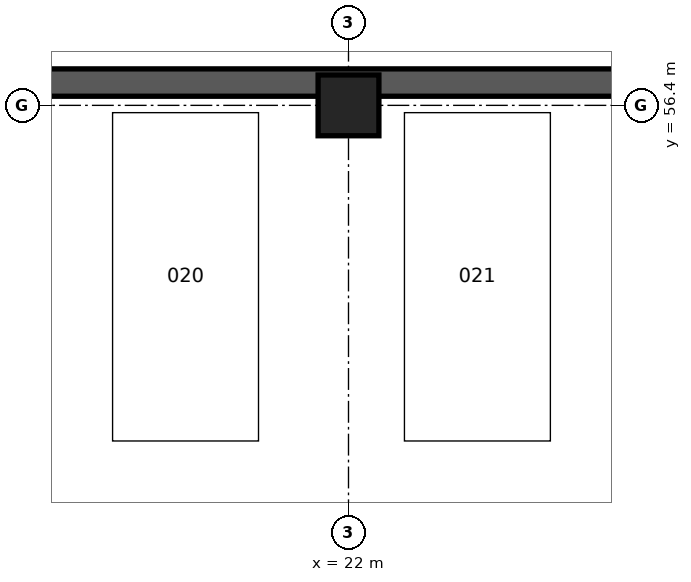
"""IFC4 building model, lengths in metres.
Left out: names, types, materials, properties, quantities, classifications, styles, units other than length and angle.
Written with IfcOpenShell. Run it as: python <this file> out.ifc"""

import sys

from ifc_helpers import new_model, si_unit, direction, frame, frame_2d, origin, origin_2d, place, context, subcontext, project, spatial, rectangle, extrude, element, save


model = new_model("IFC4")
c1 = context("Model", 3, precision=1e-05, world=origin(), true_north=direction((0.0, 1.0)))
c2 = subcontext(c1, "Body", "Model", "MODEL_VIEW")
j1 = project(units=[si_unit("LENGTHUNIT", "METRE"), si_unit("PLANEANGLEUNIT", "RADIAN")], contexts=[c1])
p1 = place(None, origin())
s1 = spatial("IfcSite", under=j1, at=p1, CompositionType="ELEMENT")
p2 = place(p1, origin())
s2 = spatial("IfcBuilding", under=s1, at=p2, CompositionType="ELEMENT")
p3 = place(p2, frame((0.0, 0.0, -3.7)))
s3 = spatial("IfcBuildingStorey", under=s2, at=p3, CompositionType="ELEMENT", Elevation=-3.7)
p4 = place(p3, frame((22.0, 56.4, 0.0), z_axis=(0.0, 0.0, 1.0), x_axis=(1.0, 0.0, 0.0)))
e1 = element("IfcColumn", 1, at=p4, inside=s3, PredefinedType="COLUMN", context=c2, shape_type="SweptSolid", body=[
    extrude(rectangle(XDim=1.0, YDim=1.0, at=origin_2d()), origin(), (0.0, 0.0, 1.0), 3.7),
])
p5 = place(p3, frame((78.0, 56.775, 0.0), z_axis=(0.0, 0.0, 1.0), x_axis=(-1.0, 0.0, 0.0)))
e2 = element("IfcWall", 2, at=p5, inside=s3, PredefinedType="SHEAR", context=c2, shape_type="SweptSolid", body=[
    extrude(rectangle(XDim=76.0, YDim=0.45, at=frame_2d((38.0, 0.0))), origin(), (0.0, 0.0, 1.0), 3.7),
])
save(model, sys.argv[1])
